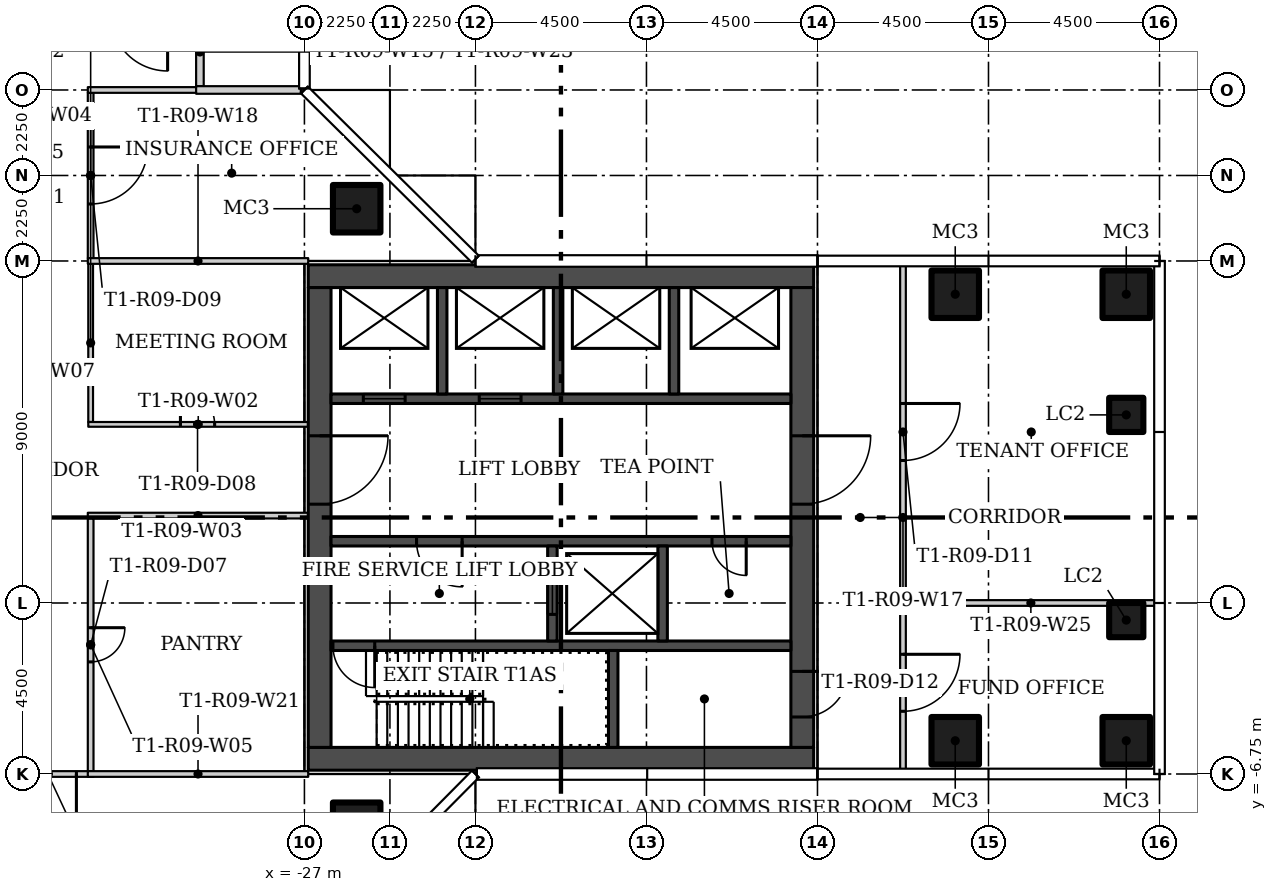
"""IFC4 building model, lengths in metres.
Left out: names, types, materials, properties, quantities, classifications, styles, units other than length and angle.
Written with IfcOpenShell. Run it as: python <this file> out.ifc"""

import sys

from ifc_helpers import new_model, si_unit, direction, frame, frame_2d, origin, origin_2d, place, context, subcontext, project, spatial, rectangle, hollow_rectangle, extrude, element, fill, save


model = new_model("IFC4")
c1 = context("Model", 3, precision=1e-05, world=origin(), true_north=direction((0.0, 1.0)))
c2 = subcontext(c1, "Body", "Model", "MODEL_VIEW")
j1 = project(units=[si_unit("LENGTHUNIT", "METRE"), si_unit("PLANEANGLEUNIT", "RADIAN")], contexts=[c1])
p1 = place(None, origin())
s1 = spatial("IfcSite", under=j1, at=p1, CompositionType="ELEMENT")
p2 = place(p1, origin())
s2 = spatial("IfcBuilding", under=s1, at=p2, CompositionType="ELEMENT")
p3 = place(p2, frame((0.0, 0.0, 89.7)))
s3 = spatial("IfcBuildingStorey", under=s2, at=p3, CompositionType="ELEMENT", Elevation=89.7)
for number, where in (
    (1, (-25.625, 8.125, 0.0)),
    (2, (-25.625, -8.125, 0.0)),
    (3, (-9.875, -5.875, 0.0)),
    (4, (-5.375, -5.875, 0.0)),
    (5, (-9.875, 5.875, 0.0)),
    (6, (-5.375, 5.875, 0.0)),
):
    element("IfcColumn", number, at=place(p3, frame(where)), inside=s3, PredefinedType="COLUMN", context=c2, shape_type="SweptSolid", body=[
        extrude(hollow_rectangle(XDim=1.25, YDim=1.25, WallThickness=0.05, at=origin_2d()), origin(), (0.0, 0.0, 1.0), 3.55),
    ])
for number, where in (
    (7, (-5.375, -2.7, 0.0)),
    (8, (-5.375, 2.7, 0.0)),
):
    element("IfcColumn", number, at=place(p3, frame(where)), inside=s3, PredefinedType="COLUMN", context=c2, shape_type="SweptSolid", body=[
        extrude(hollow_rectangle(XDim=0.9, YDim=0.9, WallThickness=0.036, at=origin_2d()), origin(), (0.0, 0.0, 1.0), 3.55),
    ])
p4 = place(p3, frame((-32.625, 6.675, 0.0), z_axis=(0.0, 0.0, 1.0), x_axis=(0.0, -1.0, 0.0)))
e9 = element("IfcWall", 9, at=p4, inside=s3, PredefinedType="PARTITIONING", context=c2, shape_type="SweptSolid", body=[
    extrude(rectangle(XDim=4.162, YDim=0.125, at=frame_2d((2.081, 0.0))), origin(), (0.0, 0.0, 1.0), 3.55),
])
p5 = place(p3, frame((-32.688, 2.45, 0.0)))
e10 = element("IfcWall", 10, at=p5, inside=s3, PredefinedType="PARTITIONING", context=c2, shape_type="SweptSolid", body=[
    extrude(rectangle(XDim=5.788, YDim=0.125, at=frame_2d((2.894, 0.0))), origin(), (0.0, 0.0, 1.0), 3.55),
])
p6 = place(p5, frame((2.425, 0.0, 0.0)))
e11 = element("IfcOpeningElement", 11, at=p6, cuts=e10, PredefinedType="OPENING", context=c2, shape_type="SweptSolid", body=[
    extrude(rectangle(XDim=0.9, YDim=2.1, at=frame_2d((0.45, 1.05))), frame((0.0, 0.073, 0.0), z_axis=(0.0, -1.0, 0.0), x_axis=(1.0, 0.0, 0.0)), (0.0, 0.0, 1.0), 0.145),
])
p7 = place(p3, frame((-26.9, 0.05, 0.0), z_axis=(0.0, 0.0, 1.0), x_axis=(-1.0, 0.0, 0.0)))
e12 = element("IfcWall", 12, at=p7, inside=s3, PredefinedType="PARTITIONING", context=c2, shape_type="SweptSolid", body=[
    extrude(rectangle(XDim=5.8, YDim=0.15, at=frame_2d((2.9, 0.0))), origin(), (0.0, 0.0, 1.0), 3.55),
])
p8 = place(p3, frame((-32.625, 11.175, 0.0), z_axis=(0.0, 0.0, 1.0), x_axis=(0.0, -1.0, 0.0)))
e13 = element("IfcWall", 13, at=p8, inside=s3, PredefinedType="PARTITIONING", context=c2, shape_type="SweptSolid", body=[
    extrude(rectangle(XDim=4.35, YDim=0.15, at=frame_2d((2.175, 0.0))), origin(), (0.0, 0.0, 1.0), 3.55),
])
p9 = place(p8, frame((1.425, 0.0, 0.0)))
e14 = element("IfcOpeningElement", 14, at=p9, cuts=e13, PredefinedType="OPENING", context=c2, shape_type="SweptSolid", body=[
    extrude(rectangle(XDim=1.5, YDim=2.1, at=frame_2d((0.75, 1.05))), frame((0.0, 0.085, 0.0), z_axis=(0.0, -1.0, 0.0), x_axis=(1.0, 0.0, 0.0)), (0.0, 0.0, 1.0), 0.17),
])
p10 = place(p3, frame((-32.625, -0.025, 0.0), z_axis=(0.0, 0.0, 1.0), x_axis=(0.0, -1.0, 0.0)))
e15 = element("IfcWall", 15, at=p10, inside=s3, PredefinedType="PARTITIONING", context=c2, shape_type="SweptSolid", body=[
    extrude(rectangle(XDim=6.65, YDim=0.15, at=frame_2d((3.325, 0.0))), origin(), (0.0, 0.0, 1.0), 3.55),
])
p11 = place(p10, frame((2.875, 0.0, 0.0)))
e16 = element("IfcOpeningElement", 16, at=p11, cuts=e15, PredefinedType="OPENING", context=c2, shape_type="SweptSolid", body=[
    extrude(rectangle(XDim=0.9, YDim=2.1, at=frame_2d((0.45, 1.05))), frame((0.0, 0.085, 0.0), z_axis=(0.0, -1.0, 0.0), x_axis=(1.0, 0.0, 0.0)), (0.0, 0.0, 1.0), 0.17),
])
p12 = place(p3, frame((-29.65, 11.25, 0.0), z_axis=(0.0, 0.0, 1.0), x_axis=(-1.0, 0.0, 0.0)))
e17 = element("IfcWall", 17, at=p12, inside=s3, PredefinedType="PARTITIONING", context=c2, shape_type="SweptSolid", body=[
    extrude(rectangle(XDim=3.05, YDim=0.15, at=frame_2d((1.525, 0.0))), origin(), (0.0, 0.0, 1.0), 3.55),
])
p13 = place(p3, frame((-29.75, 11.35, 0.0), z_axis=(0.0, 0.0, 1.0), x_axis=(0.0, 1.0, 0.0)))
e18 = element("IfcWall", 18, at=p13, inside=s3, PredefinedType="PARTITIONING", context=c2, shape_type="SweptSolid", body=[
    extrude(rectangle(XDim=1.8, YDim=0.2, at=frame_2d((0.9, 0.0))), origin(), (0.0, 0.0, 1.0), 3.55),
])
p14 = place(p3, frame((-32.55, -6.75, 0.0), z_axis=(0.0, 0.0, 1.0), x_axis=(-1.0, 0.0, 0.0)))
e19 = element("IfcWall", 19, at=p14, inside=s3, PredefinedType="PARTITIONING", context=c2, shape_type="SweptSolid", body=[
    extrude(rectangle(XDim=2.375, YDim=0.15, at=frame_2d((1.188, 0.0))), origin(), (0.0, 0.0, 1.0), 3.55),
])
p15 = place(p14, frame((0.45, 0.0, 0.0)))
e20 = element("IfcOpeningElement", 20, at=p15, cuts=e19, PredefinedType="OPENING", context=c2, shape_type="SweptSolid", body=[
    extrude(rectangle(XDim=1.5, YDim=2.1, at=frame_2d((0.75, 1.05))), frame((0.0, 0.085, 0.0), z_axis=(0.0, -1.0, 0.0), x_axis=(1.0, 0.0, 0.0)), (0.0, 0.0, 1.0), 0.17),
])
p16 = place(p3, frame((-11.25, 6.655, 0.0), z_axis=(0.0, 0.0, 1.0), x_axis=(0.0, -1.0, 0.0)))
e21 = element("IfcWall", 21, at=p16, inside=s3, PredefinedType="PARTITIONING", context=c2, shape_type="SweptSolid", body=[
    extrude(rectangle(XDim=13.31, YDim=0.15, at=frame_2d((6.655, 0.0))), origin(), (0.0, 0.0, 1.0), 3.55),
])
p17 = place(p16, frame((3.655, 0.0, 0.0)))
e22 = element("IfcOpeningElement", 22, at=p17, cuts=e21, PredefinedType="OPENING", context=c2, shape_type="SweptSolid", body=[
    extrude(rectangle(XDim=1.5, YDim=2.1, at=frame_2d((0.75, 1.05))), frame((0.0, 0.085, 0.0), z_axis=(0.0, -1.0, 0.0), x_axis=(1.0, 0.0, 0.0)), (0.0, 0.0, 1.0), 0.17),
])
p18 = place(p16, frame((10.255, 0.0, 0.0)))
e23 = element("IfcOpeningElement", 23, at=p18, cuts=e21, PredefinedType="OPENING", context=c2, shape_type="SweptSolid", body=[
    extrude(rectangle(XDim=1.5, YDim=2.1, at=frame_2d((0.75, 1.05))), frame((0.0, 0.085, 0.0), z_axis=(0.0, -1.0, 0.0), x_axis=(1.0, 0.0, 0.0)), (0.0, 0.0, 1.0), 0.17),
])
p19 = place(p3, frame((-26.9, 6.75, 0.0), z_axis=(0.0, 0.0, 1.0), x_axis=(-1.0, 0.0, 0.0)))
e24 = element("IfcWall", 24, at=p19, inside=s3, PredefinedType="PARTITIONING", context=c2, shape_type="SweptSolid", body=[
    extrude(rectangle(XDim=5.8, YDim=0.15, at=frame_2d((2.9, 0.0))), origin(), (0.0, 0.0, 1.0), 3.55),
])
p20 = place(p3, frame((-32.7, -6.75, 0.0)))
e25 = element("IfcWall", 25, at=p20, inside=s3, PredefinedType="PARTITIONING", context=c2, shape_type="SweptSolid", body=[
    extrude(rectangle(XDim=5.8, YDim=0.15, at=frame_2d((2.9, 0.0))), origin(), (0.0, 0.0, 1.0), 3.55),
])
p21 = place(p3, frame((-27.095, 11.25, 0.0), z_axis=(0.0, 0.0, 1.0), x_axis=(-1.0, 0.0, 0.0)))
e26 = element("IfcWall", 26, at=p21, inside=s3, PredefinedType="PARTITIONING", context=c2, shape_type="SweptSolid", body=[
    extrude(rectangle(XDim=2.755, YDim=0.2, at=frame_2d((1.377, 0.0))), origin(), (0.0, 0.0, 1.0), 3.55),
])
p22 = place(p3, frame((-4.595, -2.25, 0.0), z_axis=(0.0, 0.0, 1.0), x_axis=(-1.0, 0.0, 0.0)))
e27 = element("IfcWall", 27, at=p22, inside=s3, PredefinedType="PARTITIONING", context=c2, shape_type="SweptSolid", body=[
    extrude(rectangle(XDim=6.58, YDim=0.15, at=frame_2d((3.29, 0.0))), origin(), (0.0, 0.0, 1.0), 3.55),
])
for number, where in (
    (28, (-26.9, -6.35, 0.0)),
    (29, (-26.9, 6.35, 0.0)),
):
    element("IfcWall", number, at=place(p3, frame(where)), inside=s3, PredefinedType="SHEAR", context=c2, shape_type="SweptSolid", body=[
        extrude(rectangle(XDim=13.3, YDim=0.6, at=frame_2d((6.65, 0.0))), origin(), (0.0, 0.0, 1.0), 3.55),
    ])
p23 = place(p3, frame((-26.6, 6.05, 0.0), z_axis=(0.0, 0.0, 1.0), x_axis=(0.0, -1.0, 0.0)))
e30 = element("IfcWall", 30, at=p23, inside=s3, PredefinedType="SHEAR", context=c2, shape_type="SweptSolid", body=[
    extrude(rectangle(XDim=12.1, YDim=0.6, at=frame_2d((6.05, 0.0))), origin(), (0.0, 0.0, 1.0), 3.55),
])
p24 = place(p23, frame((3.9, 0.0, 0.0)))
e31 = element("IfcOpeningElement", 31, at=p24, cuts=e30, PredefinedType="OPENING", context=c2, shape_type="SweptSolid", body=[
    extrude(rectangle(XDim=1.8, YDim=2.4, at=frame_2d((0.9, 1.2))), frame((0.0, 0.31, 0.0), z_axis=(0.0, -1.0, 0.0), x_axis=(1.0, 0.0, 0.0)), (0.0, 0.0, 1.0), 0.62),
])
p25 = place(p3, frame((-13.9, 6.05, 0.0), z_axis=(0.0, 0.0, 1.0), x_axis=(0.0, -1.0, 0.0)))
e32 = element("IfcWall", 32, at=p25, inside=s3, PredefinedType="SHEAR", context=c2, shape_type="SweptSolid", body=[
    extrude(rectangle(XDim=12.1, YDim=0.6, at=frame_2d((6.05, 0.0))), origin(), (0.0, 0.0, 1.0), 3.55),
])
p26 = place(p25, frame((10.1, 0.0, 0.0)))
e33 = element("IfcOpeningElement", 33, at=p26, cuts=e32, PredefinedType="OPENING", context=c2, shape_type="SweptSolid", body=[
    extrude(rectangle(XDim=1.2, YDim=2.1, at=frame_2d((0.6, 1.05))), frame((0.0, 0.31, 0.0), z_axis=(0.0, -1.0, 0.0), x_axis=(1.0, 0.0, 0.0)), (0.0, 0.0, 1.0), 0.62),
])
p27 = place(p25, frame((3.9, 0.0, 0.0)))
e34 = element("IfcOpeningElement", 34, at=p27, cuts=e32, PredefinedType="OPENING", context=c2, shape_type="SweptSolid", body=[
    extrude(rectangle(XDim=1.8, YDim=2.4, at=frame_2d((0.9, 1.2))), frame((0.0, 0.31, 0.0), z_axis=(0.0, -1.0, 0.0), x_axis=(1.0, 0.0, 0.0)), (0.0, 0.0, 1.0), 0.62),
])
p28 = place(p3, frame((-14.2, -3.375, 0.0), z_axis=(0.0, 0.0, 1.0), x_axis=(-1.0, 0.0, 0.0)))
e35 = element("IfcWall", 35, at=p28, inside=s3, PredefinedType="SHEAR", context=c2, shape_type="SweptSolid", body=[
    extrude(rectangle(XDim=12.1, YDim=0.25, at=frame_2d((6.05, 0.0))), origin(), (0.0, 0.0, 1.0), 3.55),
])
p29 = place(p28, frame((10.95, 0.0, 0.0)))
e36 = element("IfcOpeningElement", 36, at=p29, cuts=e35, PredefinedType="OPENING", context=c2, shape_type="SweptSolid", body=[
    extrude(rectangle(XDim=1.1, YDim=2.1, at=frame_2d((0.55, 1.05))), frame((0.0, 0.135, 0.0), z_axis=(0.0, -1.0, 0.0), x_axis=(1.0, 0.0, 0.0)), (0.0, 0.0, 1.0), 0.27),
])
p30 = place(p3, frame((-18.875, -6.05, 0.0), z_axis=(0.0, 0.0, 1.0), x_axis=(0.0, 1.0, 0.0)))
e37 = element("IfcWall", 37, at=p30, inside=s3, PredefinedType="SHEAR", context=c2, shape_type="SweptSolid", body=[
    extrude(rectangle(XDim=2.55, YDim=0.25, at=frame_2d((1.275, 0.0))), origin(), (0.0, 0.0, 1.0), 3.55),
])
p31 = place(p3, frame((-14.2, -0.625, 0.0), z_axis=(0.0, 0.0, 1.0), x_axis=(-1.0, 0.0, 0.0)))
e38 = element("IfcWall", 38, at=p31, inside=s3, PredefinedType="SHEAR", context=c2, shape_type="SweptSolid", body=[
    extrude(rectangle(XDim=12.1, YDim=0.25, at=frame_2d((6.05, 0.0))), origin(), (0.0, 0.0, 1.0), 3.55),
])
p32 = place(p31, frame((8.65, 0.0, 0.0)))
e39 = element("IfcOpeningElement", 39, at=p32, cuts=e38, PredefinedType="OPENING", context=c2, shape_type="SweptSolid", body=[
    extrude(rectangle(XDim=1.2, YDim=2.1, at=frame_2d((0.6, 1.05))), frame((0.0, 0.135, 0.0), z_axis=(0.0, -1.0, 0.0), x_axis=(1.0, 0.0, 0.0)), (0.0, 0.0, 1.0), 0.27),
])
p33 = place(p31, frame((1.175, 0.0, 0.0)))
e40 = element("IfcOpeningElement", 40, at=p33, cuts=e38, PredefinedType="OPENING", context=c2, shape_type="SweptSolid", body=[
    extrude(rectangle(XDim=0.9, YDim=2.1, at=frame_2d((0.45, 1.05))), frame((0.0, 0.135, 0.0), z_axis=(0.0, -1.0, 0.0), x_axis=(1.0, 0.0, 0.0)), (0.0, 0.0, 1.0), 0.27),
])
p34 = place(p3, frame((-20.475, -3.25, 0.0), z_axis=(0.0, 0.0, 1.0), x_axis=(0.0, 1.0, 0.0)))
e41 = element("IfcWall", 41, at=p34, inside=s3, PredefinedType="SHEAR", context=c2, shape_type="SweptSolid", body=[
    extrude(rectangle(XDim=2.5, YDim=0.25, at=frame_2d((1.25, 0.0))), origin(), (0.0, 0.0, 1.0), 3.55),
])
p35 = place(p34, frame((0.7, 0.0, 0.0)))
e42 = element("IfcOpeningElement", 42, at=p35, cuts=e41, PredefinedType="OPENING", context=c2, shape_type="SweptSolid", body=[
    extrude(rectangle(XDim=1.1, YDim=2.1, at=frame_2d((0.55, 1.05))), frame((0.0, 0.135, 0.0), z_axis=(0.0, -1.0, 0.0), x_axis=(1.0, 0.0, 0.0)), (0.0, 0.0, 1.0), 0.27),
])
p36 = place(p3, frame((-17.575, -3.25, 0.0), z_axis=(0.0, 0.0, 1.0), x_axis=(0.0, 1.0, 0.0)))
e43 = element("IfcWall", 43, at=p36, inside=s3, PredefinedType="SHEAR", context=c2, shape_type="SweptSolid", body=[
    extrude(rectangle(XDim=2.5, YDim=0.25, at=frame_2d((1.25, 0.0))), origin(), (0.0, 0.0, 1.0), 3.55),
])
p37 = place(p3, frame((-26.3, 3.125, 0.0)))
e44 = element("IfcWall", 44, at=p37, inside=s3, PredefinedType="SHEAR", context=c2, shape_type="SweptSolid", body=[
    extrude(rectangle(XDim=12.1, YDim=0.25, at=frame_2d((6.05, 0.0))), origin(), (0.0, 0.0, 1.0), 3.55),
])
p38 = place(p37, frame((0.85, 0.0, 0.0)))
e45 = element("IfcOpeningElement", 45, at=p38, cuts=e44, PredefinedType="OPENING", context=c2, shape_type="SweptSolid", body=[
    extrude(rectangle(XDim=1.1, YDim=2.1, at=frame_2d((0.55, 1.05))), frame((0.0, 0.135, 0.0), z_axis=(0.0, -1.0, 0.0), x_axis=(1.0, 0.0, 0.0)), (0.0, 0.0, 1.0), 0.27),
])
p39 = place(p37, frame((3.9, 0.0, 0.0)))
e46 = element("IfcOpeningElement", 46, at=p39, cuts=e44, PredefinedType="OPENING", context=c2, shape_type="SweptSolid", body=[
    extrude(rectangle(XDim=1.1, YDim=2.1, at=frame_2d((0.55, 1.05))), frame((0.0, 0.135, 0.0), z_axis=(0.0, -1.0, 0.0), x_axis=(1.0, 0.0, 0.0)), (0.0, 0.0, 1.0), 0.27),
])
for number, where, z_axis, x_axis in (
    (47, (-23.375, 3.25, 0.0), (0.0, 0.0, 1.0), (0.0, 1.0, 0.0)),
    (48, (-20.325, 3.25, 0.0), (0.0, 0.0, 1.0), (0.0, 1.0, 0.0)),
    (49, (-17.275, 3.25, 0.0), (0.0, 0.0, 1.0), (0.0, 1.0, 0.0)),
):
    element("IfcWall", number, at=place(p3, frame(where, z_axis=z_axis, x_axis=x_axis)), inside=s3, PredefinedType="SHEAR", context=c2, shape_type="SweptSolid", body=[
        extrude(rectangle(XDim=2.8, YDim=0.25, at=frame_2d((1.4, 0.0))), origin(), (0.0, 0.0, 1.0), 3.55),
    ])
p40 = place(p15, origin())
e50 = element("IfcDoor", 50, at=p40, inside=s3, OperationType="DOUBLE_DOOR_SINGLE_SWING", PredefinedType="DOOR", context=c2, shape_type="SweptSolid", body=[
    extrude(rectangle(XDim=1.5, YDim=2.1, at=frame_2d((0.75, 1.05))), frame((0.0, 0.025, 0.0), z_axis=(0.0, -1.0, 0.0), x_axis=(1.0, 0.0, 0.0)), (0.0, 0.0, 1.0), 0.05),
])
fill(e20, e50)
p41 = place(p11, origin())
e51 = element("IfcDoor", 51, at=p41, inside=s3, OperationType="SINGLE_SWING_LEFT", PredefinedType="DOOR", context=c2, shape_type="SweptSolid", body=[
    extrude(rectangle(XDim=0.9, YDim=2.1, at=frame_2d((0.45, 1.05))), frame((0.0, 0.025, 0.0), z_axis=(0.0, -1.0, 0.0), x_axis=(1.0, 0.0, 0.0)), (0.0, 0.0, 1.0), 0.05),
])
fill(e16, e51)
p42 = place(p6, origin())
e52 = element("IfcDoor", 52, at=p42, inside=s3, OperationType="SINGLE_SWING_RIGHT", PredefinedType="DOOR", context=c2, shape_type="SweptSolid", body=[
    extrude(rectangle(XDim=0.9, YDim=2.1, at=frame_2d((0.45, 1.05))), frame((0.0, 0.025, 0.0), z_axis=(0.0, -1.0, 0.0), x_axis=(1.0, 0.0, 0.0)), (0.0, 0.0, 1.0), 0.05),
])
fill(e11, e52)
p43 = place(p9, origin())
e53 = element("IfcDoor", 53, at=p43, inside=s3, OperationType="DOUBLE_DOOR_SINGLE_SWING", PredefinedType="DOOR", context=c2, shape_type="SweptSolid", body=[
    extrude(rectangle(XDim=1.5, YDim=2.1, at=frame_2d((0.75, 1.05))), frame((0.0, 0.025, 0.0), z_axis=(0.0, -1.0, 0.0), x_axis=(1.0, 0.0, 0.0)), (0.0, 0.0, 1.0), 0.05),
])
fill(e14, e53)
p44 = place(p17, origin())
e54 = element("IfcDoor", 54, at=p44, inside=s3, OperationType="DOUBLE_DOOR_SINGLE_SWING", PredefinedType="DOOR", context=c2, shape_type="SweptSolid", body=[
    extrude(rectangle(XDim=1.5, YDim=2.1, at=frame_2d((0.75, 1.05))), frame((0.0, 0.025, 0.0), z_axis=(0.0, -1.0, 0.0), x_axis=(1.0, 0.0, 0.0)), (0.0, 0.0, 1.0), 0.05),
])
fill(e22, e54)
p45 = place(p18, origin())
e55 = element("IfcDoor", 55, at=p45, inside=s3, OperationType="DOUBLE_DOOR_SINGLE_SWING", PredefinedType="DOOR", context=c2, shape_type="SweptSolid", body=[
    extrude(rectangle(XDim=1.5, YDim=2.1, at=frame_2d((0.75, 1.05))), frame((0.0, 0.025, 0.0), z_axis=(0.0, -1.0, 0.0), x_axis=(1.0, 0.0, 0.0)), (0.0, 0.0, 1.0), 0.05),
])
fill(e23, e55)
p46 = place(p24, origin())
e56 = element("IfcDoor", 56, at=p46, inside=s3, OperationType="DOUBLE_DOOR_SINGLE_SWING", PredefinedType="DOOR", context=c2, shape_type="SweptSolid", body=[
    extrude(rectangle(XDim=1.8, YDim=2.4, at=frame_2d((0.9, 1.2))), frame((0.0, 0.025, 0.0), z_axis=(0.0, -1.0, 0.0), x_axis=(1.0, 0.0, 0.0)), (0.0, 0.0, 1.0), 0.05),
])
fill(e31, e56)
p47 = place(p26, origin())
e57 = element("IfcDoor", 57, at=p47, inside=s3, OperationType="SINGLE_SWING_RIGHT", PredefinedType="DOOR", context=c2, shape_type="SweptSolid", body=[
    extrude(rectangle(XDim=1.2, YDim=2.1, at=frame_2d((0.6, 1.05))), frame((0.0, 0.025, 0.0), z_axis=(0.0, -1.0, 0.0), x_axis=(1.0, 0.0, 0.0)), (0.0, 0.0, 1.0), 0.05),
])
fill(e33, e57)
p48 = place(p27, origin())
e58 = element("IfcDoor", 58, at=p48, inside=s3, OperationType="DOUBLE_DOOR_SINGLE_SWING", PredefinedType="DOOR", context=c2, shape_type="SweptSolid", body=[
    extrude(rectangle(XDim=1.8, YDim=2.4, at=frame_2d((0.9, 1.2))), frame((0.0, 0.025, 0.0), z_axis=(0.0, -1.0, 0.0), x_axis=(1.0, 0.0, 0.0)), (0.0, 0.0, 1.0), 0.05),
])
fill(e34, e58)
p49 = place(p29, origin())
e59 = element("IfcDoor", 59, at=p49, inside=s3, OperationType="SINGLE_SWING_RIGHT", PredefinedType="DOOR", context=c2, shape_type="SweptSolid", body=[
    extrude(rectangle(XDim=1.1, YDim=2.1, at=frame_2d((0.55, 1.05))), frame((0.0, 0.025, 0.0), z_axis=(0.0, -1.0, 0.0), x_axis=(1.0, 0.0, 0.0)), (0.0, 0.0, 1.0), 0.05),
])
fill(e36, e59)
p50 = place(p32, origin())
e60 = element("IfcDoor", 60, at=p50, inside=s3, OperationType="SINGLE_SWING_RIGHT", PredefinedType="DOOR", context=c2, shape_type="SweptSolid", body=[
    extrude(rectangle(XDim=1.2, YDim=2.1, at=frame_2d((0.6, 1.05))), frame((0.0, 0.025, 0.0), z_axis=(0.0, -1.0, 0.0), x_axis=(1.0, 0.0, 0.0)), (0.0, 0.0, 1.0), 0.05),
])
fill(e39, e60)
p51 = place(p33, origin())
e61 = element("IfcDoor", 61, at=p51, inside=s3, OperationType="SINGLE_SWING_LEFT", PredefinedType="DOOR", context=c2, shape_type="SweptSolid", body=[
    extrude(rectangle(XDim=0.9, YDim=2.1, at=frame_2d((0.45, 1.05))), frame((0.0, 0.025, 0.0), z_axis=(0.0, -1.0, 0.0), x_axis=(1.0, 0.0, 0.0)), (0.0, 0.0, 1.0), 0.05),
])
fill(e40, e61)
p52 = place(p35, origin())
e62 = element("IfcDoor", 62, at=p52, inside=s3, OperationType="SLIDING_TO_LEFT", PredefinedType="DOOR", context=c2, shape_type="SweptSolid", body=[
    extrude(rectangle(XDim=1.1, YDim=2.1, at=frame_2d((0.55, 1.05))), frame((0.0, 0.025, 0.0), z_axis=(0.0, -1.0, 0.0), x_axis=(1.0, 0.0, 0.0)), (0.0, 0.0, 1.0), 0.05),
])
fill(e42, e62)
p53 = place(p38, origin())
e63 = element("IfcDoor", 63, at=p53, inside=s3, OperationType="SLIDING_TO_LEFT", PredefinedType="DOOR", context=c2, shape_type="SweptSolid", body=[
    extrude(rectangle(XDim=1.1, YDim=2.1, at=frame_2d((0.55, 1.05))), frame((0.0, 0.025, 0.0), z_axis=(0.0, -1.0, 0.0), x_axis=(1.0, 0.0, 0.0)), (0.0, 0.0, 1.0), 0.05),
])
fill(e45, e63)
p54 = place(p39, origin())
e64 = element("IfcDoor", 64, at=p54, inside=s3, OperationType="SLIDING_TO_LEFT", PredefinedType="DOOR", context=c2, shape_type="SweptSolid", body=[
    extrude(rectangle(XDim=1.1, YDim=2.1, at=frame_2d((0.55, 1.05))), frame((0.0, 0.025, 0.0), z_axis=(0.0, -1.0, 0.0), x_axis=(1.0, 0.0, 0.0)), (0.0, 0.0, 1.0), 0.05),
])
fill(e46, e64)
save(model, sys.argv[1])
